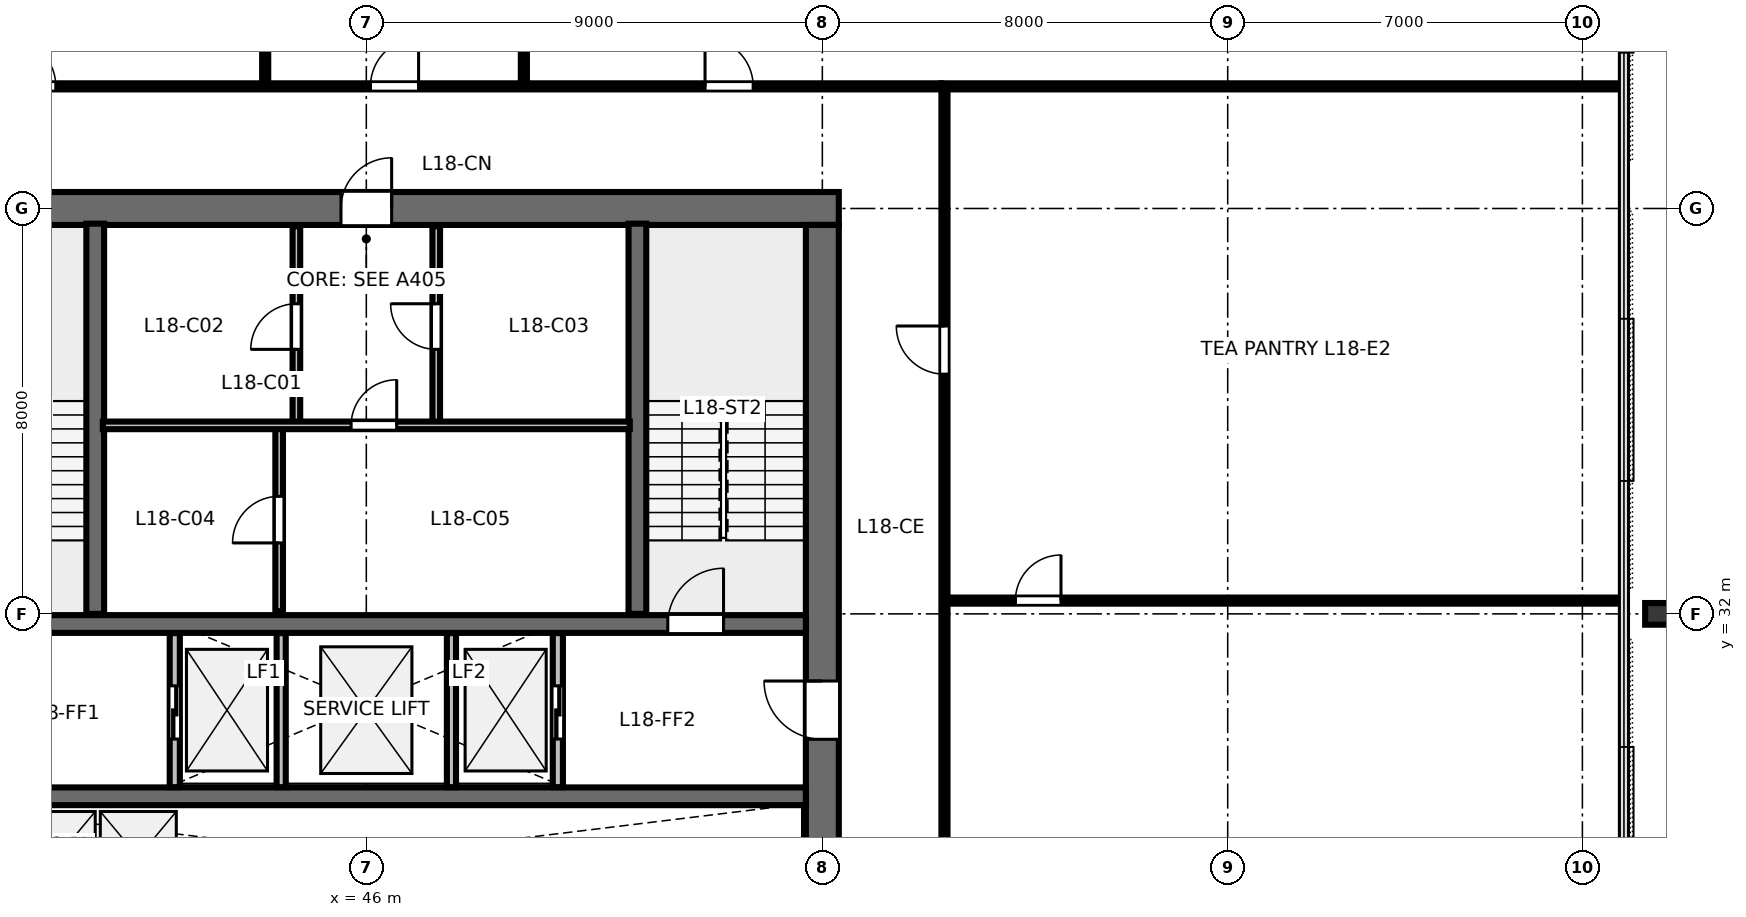
"""IFC4 building model, lengths in metres.
Left out: names, types, materials, properties, quantities, classifications, styles, units other than length and angle.
Written with IfcOpenShell. Run it as: python <this file> out.ifc"""

import sys

from ifc_helpers import new_model, si_unit, direction, frame, frame_2d, origin, origin_2d, place, context, subcontext, project, spatial, rectangle, i_section, extrude, element, fill, save


model = new_model("IFC4")
c1 = context("Model", 3, precision=1e-05, world=origin(), true_north=direction((0.0, 1.0)))
c2 = subcontext(c1, "Body", "Model", "MODEL_VIEW")
j1 = project(units=[si_unit("LENGTHUNIT", "METRE"), si_unit("PLANEANGLEUNIT", "RADIAN")], contexts=[c1])
p1 = place(None, origin())
s1 = spatial("IfcSite", under=j1, at=p1, CompositionType="ELEMENT")
p2 = place(p1, origin())
s2 = spatial("IfcBuilding", under=s1, at=p2, CompositionType="ELEMENT")
p3 = place(p2, frame((0.0, 0.0, 71.2)))
s3 = spatial("IfcBuildingStorey", under=s2, at=p3, CompositionType="ELEMENT", Elevation=71.2)
p4 = place(p3, frame((36.675, 40.0, 0.0), z_axis=(0.0, 0.0, 1.0), x_axis=(1.0, 0.0, 0.0)))
e1 = element("IfcWall", 1, at=p4, inside=s3, PredefinedType="SHEAR", context=c2, shape_type="SweptSolid", body=[
    extrude(rectangle(XDim=18.65, YDim=0.65, at=frame_2d((9.325, 0.0))), origin(), (0.0, 0.0, 1.0), 3.36),
])
p5 = place(p4, frame((8.825, 0.0, 0.0)))
e2 = element("IfcOpeningElement", 2, at=p5, cuts=e1, PredefinedType="OPENING", context=c2, shape_type="SweptSolid", body=[
    extrude(rectangle(XDim=1.0, YDim=2.15, at=frame_2d((0.5, 1.075))), frame((0.0, 0.335, 0.0), z_axis=(0.0, -1.0, 0.0), x_axis=(1.0, 0.0, 0.0)), (0.0, 0.0, 1.0), 0.67),
])
p6 = place(p3, frame((55.0, 24.325, 0.0), z_axis=(0.0, 0.0, 1.0), x_axis=(0.0, 1.0, 0.0)))
e3 = element("IfcWall", 3, at=p6, inside=s3, PredefinedType="SHEAR", context=c2, shape_type="SweptSolid", body=[
    extrude(rectangle(XDim=15.35, YDim=0.65, at=frame_2d((7.675, 0.0))), origin(), (0.0, 0.0, 1.0), 3.36),
])
p7 = place(p6, frame((5.2, 0.0, 0.0)))
e4 = element("IfcOpeningElement", 4, at=p7, cuts=e3, PredefinedType="OPENING", context=c2, shape_type="SweptSolid", body=[
    extrude(rectangle(XDim=1.15, YDim=2.15, at=frame_2d((0.575, 1.075))), frame((0.0, 0.335, 0.0), z_axis=(0.0, -1.0, 0.0), x_axis=(1.0, 0.0, 0.0)), (0.0, 0.0, 1.0), 0.67),
])
p8 = place(p3, frame((37.325, 31.8, 0.0), z_axis=(0.0, 0.0, 1.0), x_axis=(1.0, 0.0, 0.0)))
e5 = element("IfcWall", 5, at=p8, inside=s3, PredefinedType="SHEAR", context=c2, shape_type="SweptSolid", body=[
    extrude(rectangle(XDim=17.35, YDim=0.35, at=frame_2d((8.675, 0.0))), origin(), (0.0, 0.0, 1.0), 3.36),
])
p9 = place(p8, frame((0.725, 0.0, 0.0)))
e6 = element("IfcOpeningElement", 6, at=p9, cuts=e5, PredefinedType="OPENING", context=c2, shape_type="SweptSolid", body=[
    extrude(rectangle(XDim=1.1, YDim=2.15, at=frame_2d((0.55, 1.075))), frame((0.0, 0.185, 0.0), z_axis=(0.0, -1.0, 0.0), x_axis=(1.0, 0.0, 0.0)), (0.0, 0.0, 1.0), 0.37),
])
p10 = place(p8, frame((14.625, 0.0, 0.0)))
e7 = element("IfcOpeningElement", 7, at=p10, cuts=e5, PredefinedType="OPENING", context=c2, shape_type="SweptSolid", body=[
    extrude(rectangle(XDim=1.1, YDim=2.15, at=frame_2d((0.55, 1.075))), frame((0.0, 0.185, 0.0), z_axis=(0.0, -1.0, 0.0), x_axis=(1.0, 0.0, 0.0)), (0.0, 0.0, 1.0), 0.37),
])
p11 = place(p3, frame((37.325, 28.4, 0.0), z_axis=(0.0, 0.0, 1.0), x_axis=(1.0, 0.0, 0.0)))
e8 = element("IfcWall", 8, at=p11, inside=s3, PredefinedType="SHEAR", context=c2, shape_type="SweptSolid", body=[
    extrude(rectangle(XDim=17.35, YDim=0.35, at=frame_2d((8.675, 0.0))), origin(), (0.0, 0.0, 1.0), 3.36),
])
p12 = place(p3, frame((71.48, 32.0, 0.0), z_axis=(0.0, 0.0, 1.0), x_axis=(0.0, 1.0, 0.0)))
e9 = element("IfcColumn", 9, at=p12, inside=s3, PredefinedType="COLUMN", context=c2, shape_type="SweptSolid", body=[
    extrude(i_section(OverallWidth=0.428, OverallDepth=0.483, WebThickness=0.051, FlangeThickness=0.082, FilletRadius=0.025, at=origin_2d()), origin(), (0.0, 0.0, 1.0), 3.358),
])
for number, where, z_axis, x_axis in (
    (10, (40.65, 32.0, 0.0), (0.0, 0.0, 1.0), (0.0, 1.0, 0.0)),
    (11, (51.35, 32.0, 0.0), (0.0, 0.0, 1.0), (0.0, 1.0, 0.0)),
):
    element("IfcWall", number, at=place(p3, frame(where, z_axis=z_axis, x_axis=x_axis)), inside=s3, PredefinedType="SHEAR", context=c2, shape_type="SweptSolid", body=[
        extrude(rectangle(XDim=7.7, YDim=0.35, at=frame_2d((3.85, 0.0))), origin(), (0.0, 0.0, 1.0), 3.6),
    ])
p13 = place(p3, frame((44.62, 35.72, 0.0), z_axis=(0.0, 0.0, 1.0), x_axis=(0.0, 1.0, 0.0)))
e12 = element("IfcWall", 12, at=p13, inside=s3, PredefinedType="PARTITIONING", context=c2, shape_type="SweptSolid", body=[
    extrude(rectangle(XDim=3.93, YDim=0.15, at=frame_2d((1.965, 0.0))), origin(), (0.0, 0.0, 1.0), 3.36),
])
p14 = place(p13, frame((1.5, 0.0, 0.0)))
e13 = element("IfcOpeningElement", 13, at=p14, cuts=e12, PredefinedType="OPENING", context=c2, shape_type="SweptSolid", body=[
    extrude(rectangle(XDim=0.9, YDim=2.15, at=frame_2d((0.45, 1.075))), frame((0.0, 0.085, 0.0), z_axis=(0.0, -1.0, 0.0), x_axis=(1.0, 0.0, 0.0)), (0.0, 0.0, 1.0), 0.17),
])
p15 = place(p3, frame((47.38, 35.72, 0.0), z_axis=(0.0, 0.0, 1.0), x_axis=(0.0, 1.0, 0.0)))
e14 = element("IfcWall", 14, at=p15, inside=s3, PredefinedType="PARTITIONING", context=c2, shape_type="SweptSolid", body=[
    extrude(rectangle(XDim=3.93, YDim=0.15, at=frame_2d((1.965, 0.0))), origin(), (0.0, 0.0, 1.0), 3.36),
])
p16 = place(p15, frame((1.5, 0.0, 0.0)))
e15 = element("IfcOpeningElement", 15, at=p16, cuts=e14, PredefinedType="OPENING", context=c2, shape_type="SweptSolid", body=[
    extrude(rectangle(XDim=0.9, YDim=2.15, at=frame_2d((0.45, 1.075))), frame((0.0, 0.085, 0.0), z_axis=(0.0, -1.0, 0.0), x_axis=(1.0, 0.0, 0.0)), (0.0, 0.0, 1.0), 0.17),
])
p17 = place(p3, frame((44.28, 32.05, 0.0), z_axis=(0.0, 0.0, 1.0), x_axis=(0.0, 1.0, 0.0)))
e16 = element("IfcWall", 16, at=p17, inside=s3, PredefinedType="PARTITIONING", context=c2, shape_type="SweptSolid", body=[
    extrude(rectangle(XDim=3.67, YDim=0.15, at=frame_2d((1.835, 0.0))), origin(), (0.0, 0.0, 1.0), 3.36),
])
p18 = place(p17, frame((1.35, 0.0, 0.0)))
e17 = element("IfcOpeningElement", 17, at=p18, cuts=e16, PredefinedType="OPENING", context=c2, shape_type="SweptSolid", body=[
    extrude(rectangle(XDim=0.92, YDim=2.15, at=frame_2d((0.46, 1.075))), frame((0.0, 0.085, 0.0), z_axis=(0.0, -1.0, 0.0), x_axis=(1.0, 0.0, 0.0)), (0.0, 0.0, 1.0), 0.17),
])
p19 = place(p3, frame((40.8, 35.72, 0.0), z_axis=(0.0, 0.0, 1.0), x_axis=(1.0, 0.0, 0.0)))
e18 = element("IfcWall", 18, at=p19, inside=s3, PredefinedType="PARTITIONING", context=c2, shape_type="SweptSolid", body=[
    extrude(rectangle(XDim=10.4, YDim=0.15, at=frame_2d((5.2, 0.0))), origin(), (0.0, 0.0, 1.0), 3.36),
])
p20 = place(p19, frame((4.9, 0.0, 0.0)))
e19 = element("IfcOpeningElement", 19, at=p20, cuts=e18, PredefinedType="OPENING", context=c2, shape_type="SweptSolid", body=[
    extrude(rectangle(XDim=0.9, YDim=2.15, at=frame_2d((0.45, 1.075))), frame((0.0, 0.085, 0.0), z_axis=(0.0, -1.0, 0.0), x_axis=(1.0, 0.0, 0.0)), (0.0, 0.0, 1.0), 0.17),
])
p21 = place(p3, frame((42.22, 28.58, 0.0), z_axis=(0.0, 0.0, 1.0), x_axis=(0.0, 1.0, 0.0)))
e20 = element("IfcWall", 20, at=p21, inside=s3, PredefinedType="PARTITIONING", context=c2, shape_type="SweptSolid", body=[
    extrude(rectangle(XDim=3.04, YDim=0.2, at=frame_2d((1.52, 0.0))), origin(), (0.0, 0.0, 1.0), 3.36),
])
p22 = place(p21, frame((0.95, 0.0, 0.0)))
e21 = element("IfcOpeningElement", 21, at=p22, cuts=e20, PredefinedType="OPENING", context=c2, shape_type="SweptSolid", body=[
    extrude(rectangle(XDim=1.05, YDim=2.15, at=frame_2d((0.525, 1.075))), frame((0.0, 0.11, 0.0), z_axis=(0.0, -1.0, 0.0), x_axis=(1.0, 0.0, 0.0)), (0.0, 0.0, 1.0), 0.22),
])
p23 = place(p3, frame((49.78, 28.58, 0.0), z_axis=(0.0, 0.0, 1.0), x_axis=(0.0, 1.0, 0.0)))
e22 = element("IfcWall", 22, at=p23, inside=s3, PredefinedType="PARTITIONING", context=c2, shape_type="SweptSolid", body=[
    extrude(rectangle(XDim=3.04, YDim=0.2, at=frame_2d((1.52, 0.0))), origin(), (0.0, 0.0, 1.0), 3.36),
])
p24 = place(p23, frame((0.95, 0.0, 0.0)))
e23 = element("IfcOpeningElement", 23, at=p24, cuts=e22, PredefinedType="OPENING", context=c2, shape_type="SweptSolid", body=[
    extrude(rectangle(XDim=1.05, YDim=2.15, at=frame_2d((0.525, 1.075))), frame((0.0, 0.11, 0.0), z_axis=(0.0, -1.0, 0.0), x_axis=(1.0, 0.0, 0.0)), (0.0, 0.0, 1.0), 0.22),
])
for number, where, z_axis, x_axis in (
    (24, (44.32, 28.58, 0.0), (0.0, 0.0, 1.0), (0.0, 1.0, 0.0)),
    (25, (47.68, 28.58, 0.0), (0.0, 0.0, 1.0), (0.0, 1.0, 0.0)),
):
    element("IfcWall", number, at=place(p3, frame(where, z_axis=z_axis, x_axis=x_axis)), inside=s3, PredefinedType="PARTITIONING", context=c2, shape_type="SweptSolid", body=[
        extrude(rectangle(XDim=3.04, YDim=0.18, at=frame_2d((1.52, 0.0))), origin(), (0.0, 0.0, 1.0), 3.36),
    ])
p25 = place(p3, frame((44.004, 42.41, 0.0), z_axis=(0.0, 0.0, 1.0), x_axis=(0.0, 1.0, 0.0)))
e26 = element("IfcWall", 26, at=p25, inside=s3, PredefinedType="PARTITIONING", context=c2, shape_type="SweptSolid", body=[
    extrude(rectangle(XDim=11.41, YDim=0.12, at=frame_2d((5.705, 0.0))), origin(), (0.0, 0.0, 1.0), 2.64),
])
p26 = place(p25, frame((1.4, 0.0, 0.0)))
e27 = element("IfcOpeningElement", 27, at=p26, cuts=e26, PredefinedType="OPENING", context=c2, shape_type="SweptSolid", body=[
    extrude(rectangle(XDim=0.9, YDim=2.15, at=frame_2d((0.45, 1.075))), frame((0.0, 0.07, 0.0), z_axis=(0.0, -1.0, 0.0), x_axis=(1.0, 0.0, 0.0)), (0.0, 0.0, 1.0), 0.14),
])
p27 = place(p3, frame((49.11, 42.41, 0.0), z_axis=(0.0, 0.0, 1.0), x_axis=(0.0, 1.0, 0.0)))
e28 = element("IfcWall", 28, at=p27, inside=s3, PredefinedType="PARTITIONING", context=c2, shape_type="SweptSolid", body=[
    extrude(rectangle(XDim=11.41, YDim=0.12, at=frame_2d((5.705, 0.0))), origin(), (0.0, 0.0, 1.0), 2.64),
])
p28 = place(p27, frame((1.4, 0.0, 0.0)))
e29 = element("IfcOpeningElement", 29, at=p28, cuts=e28, PredefinedType="OPENING", context=c2, shape_type="SweptSolid", body=[
    extrude(rectangle(XDim=0.9, YDim=2.15, at=frame_2d((0.45, 1.075))), frame((0.0, 0.07, 0.0), z_axis=(0.0, -1.0, 0.0), x_axis=(1.0, 0.0, 0.0)), (0.0, 0.0, 1.0), 0.14),
])
p29 = place(p3, frame((34.65, 42.41, 0.0), z_axis=(0.0, 0.0, 1.0), x_axis=(1.0, 0.0, 0.0)))
e30 = element("IfcWall", 30, at=p29, inside=s3, PredefinedType="PARTITIONING", context=c2, shape_type="SweptSolid", body=[
    extrude(rectangle(XDim=22.7, YDim=0.12, at=frame_2d((11.35, 0.0))), origin(), (0.0, 0.0, 1.0), 2.64),
])
p30 = place(p29, frame((4.272, 0.0, 0.0)))
e31 = element("IfcOpeningElement", 31, at=p30, cuts=e30, PredefinedType="OPENING", context=c2, shape_type="SweptSolid", body=[
    extrude(rectangle(XDim=0.95, YDim=2.15, at=frame_2d((0.475, 1.075))), frame((0.0, 0.07, 0.0), z_axis=(0.0, -1.0, 0.0), x_axis=(1.0, 0.0, 0.0)), (0.0, 0.0, 1.0), 0.14),
])
p31 = place(p29, frame((11.432, 0.0, 0.0)))
e32 = element("IfcOpeningElement", 32, at=p31, cuts=e30, PredefinedType="OPENING", context=c2, shape_type="SweptSolid", body=[
    extrude(rectangle(XDim=0.95, YDim=2.15, at=frame_2d((0.475, 1.075))), frame((0.0, 0.07, 0.0), z_axis=(0.0, -1.0, 0.0), x_axis=(1.0, 0.0, 0.0)), (0.0, 0.0, 1.0), 0.14),
])
p32 = place(p29, frame((18.035, 0.0, 0.0)))
e33 = element("IfcOpeningElement", 33, at=p32, cuts=e30, PredefinedType="OPENING", context=c2, shape_type="SweptSolid", body=[
    extrude(rectangle(XDim=0.95, YDim=2.15, at=frame_2d((0.475, 1.075))), frame((0.0, 0.07, 0.0), z_axis=(0.0, -1.0, 0.0), x_axis=(1.0, 0.0, 0.0)), (0.0, 0.0, 1.0), 0.14),
])
p33 = place(p3, frame((57.41, 32.262, 0.0), z_axis=(0.0, 0.0, 1.0), x_axis=(1.0, 0.0, 0.0)))
e34 = element("IfcWall", 34, at=p33, inside=s3, PredefinedType="PARTITIONING", context=c2, shape_type="SweptSolid", body=[
    extrude(rectangle(XDim=13.41, YDim=0.12, at=frame_2d((6.705, 0.0))), origin(), (0.0, 0.0, 1.0), 2.64),
])
p34 = place(p33, frame((1.4, 0.0, 0.0)))
e35 = element("IfcOpeningElement", 35, at=p34, cuts=e34, PredefinedType="OPENING", context=c2, shape_type="SweptSolid", body=[
    extrude(rectangle(XDim=0.9, YDim=2.15, at=frame_2d((0.45, 1.075))), frame((0.0, 0.07, 0.0), z_axis=(0.0, -1.0, 0.0), x_axis=(1.0, 0.0, 0.0)), (0.0, 0.0, 1.0), 0.14),
])
p35 = place(p3, frame((57.41, 21.65, 0.0), z_axis=(0.0, 0.0, 1.0), x_axis=(0.0, 1.0, 0.0)))
e36 = element("IfcWall", 36, at=p35, inside=s3, PredefinedType="PARTITIONING", context=c2, shape_type="SweptSolid", body=[
    extrude(rectangle(XDim=20.7, YDim=0.12, at=frame_2d((10.35, 0.0))), origin(), (0.0, 0.0, 1.0), 2.64),
])
p36 = place(p35, frame((4.931, 0.0, 0.0)))
e37 = element("IfcOpeningElement", 37, at=p36, cuts=e36, PredefinedType="OPENING", context=c2, shape_type="SweptSolid", body=[
    extrude(rectangle(XDim=0.95, YDim=2.15, at=frame_2d((0.475, 1.075))), frame((0.0, 0.07, 0.0), z_axis=(0.0, -1.0, 0.0), x_axis=(1.0, 0.0, 0.0)), (0.0, 0.0, 1.0), 0.14),
])
p37 = place(p35, frame((15.081, 0.0, 0.0)))
e38 = element("IfcOpeningElement", 38, at=p37, cuts=e36, PredefinedType="OPENING", context=c2, shape_type="SweptSolid", body=[
    extrude(rectangle(XDim=0.95, YDim=2.15, at=frame_2d((0.475, 1.075))), frame((0.0, 0.07, 0.0), z_axis=(0.0, -1.0, 0.0), x_axis=(1.0, 0.0, 0.0)), (0.0, 0.0, 1.0), 0.14),
])
p38 = place(p3, frame((57.35, 42.41, 0.0), z_axis=(0.0, 0.0, 1.0), x_axis=(1.0, 0.0, 0.0)))
e39 = element("IfcWall", 39, at=p38, inside=s3, PredefinedType="PARTITIONING", context=c2, shape_type="SweptSolid", body=[
    extrude(rectangle(XDim=13.47, YDim=0.12, at=frame_2d((6.735, 0.0))), origin(), (0.0, 0.0, 1.0), 2.64),
])
p39 = place(p10, origin())
e40 = element("IfcDoor", 40, at=p39, inside=s3, OperationType="SINGLE_SWING_RIGHT", PredefinedType="DOOR", context=c2, shape_type="SweptSolid", body=[
    extrude(rectangle(XDim=1.1, YDim=2.15, at=frame_2d((0.55, 1.075))), frame((0.0, 0.025, 0.0), z_axis=(0.0, -1.0, 0.0), x_axis=(1.0, 0.0, 0.0)), (0.0, 0.0, 1.0), 0.05),
])
fill(e7, e40)
p40 = place(p5, origin())
e41 = element("IfcDoor", 41, at=p40, inside=s3, OperationType="SINGLE_SWING_RIGHT", PredefinedType="DOOR", context=c2, shape_type="SweptSolid", body=[
    extrude(rectangle(XDim=1.0, YDim=2.15, at=frame_2d((0.5, 1.075))), frame((0.0, 0.025, 0.0), z_axis=(0.0, -1.0, 0.0), x_axis=(1.0, 0.0, 0.0)), (0.0, 0.0, 1.0), 0.05),
])
fill(e2, e41)
p41 = place(p7, origin())
e42 = element("IfcDoor", 42, at=p41, inside=s3, OperationType="SINGLE_SWING_RIGHT", PredefinedType="DOOR", context=c2, shape_type="SweptSolid", body=[
    extrude(rectangle(XDim=1.15, YDim=2.15, at=frame_2d((0.575, 1.075))), frame((0.0, 0.025, 0.0), z_axis=(0.0, -1.0, 0.0), x_axis=(1.0, 0.0, 0.0)), (0.0, 0.0, 1.0), 0.05),
])
fill(e4, e42)
p42 = place(p14, origin())
e43 = element("IfcDoor", 43, at=p42, inside=s3, OperationType="SINGLE_SWING_LEFT", PredefinedType="DOOR", context=c2, shape_type="SweptSolid", body=[
    extrude(rectangle(XDim=0.9, YDim=2.15, at=frame_2d((0.45, 1.075))), frame((0.0, 0.025, 0.0), z_axis=(0.0, -1.0, 0.0), x_axis=(1.0, 0.0, 0.0)), (0.0, 0.0, 1.0), 0.05),
])
fill(e13, e43)
p43 = place(p16, origin())
e44 = element("IfcDoor", 44, at=p43, inside=s3, OperationType="SINGLE_SWING_RIGHT", PredefinedType="DOOR", context=c2, shape_type="SweptSolid", body=[
    extrude(rectangle(XDim=0.9, YDim=2.15, at=frame_2d((0.45, 1.075))), frame((0.0, 0.025, 0.0), z_axis=(0.0, -1.0, 0.0), x_axis=(1.0, 0.0, 0.0)), (0.0, 0.0, 1.0), 0.05),
])
fill(e15, e44)
p44 = place(p18, origin())
e45 = element("IfcDoor", 45, at=p44, inside=s3, OperationType="SINGLE_SWING_LEFT", PredefinedType="DOOR", context=c2, shape_type="SweptSolid", body=[
    extrude(rectangle(XDim=0.92, YDim=2.15, at=frame_2d((0.46, 1.075))), frame((0.0, 0.025, 0.0), z_axis=(0.0, -1.0, 0.0), x_axis=(1.0, 0.0, 0.0)), (0.0, 0.0, 1.0), 0.05),
])
fill(e17, e45)
p45 = place(p20, origin())
e46 = element("IfcDoor", 46, at=p45, inside=s3, OperationType="SINGLE_SWING_RIGHT", PredefinedType="DOOR", context=c2, shape_type="SweptSolid", body=[
    extrude(rectangle(XDim=0.9, YDim=2.15, at=frame_2d((0.45, 1.075))), frame((0.0, 0.025, 0.0), z_axis=(0.0, -1.0, 0.0), x_axis=(1.0, 0.0, 0.0)), (0.0, 0.0, 1.0), 0.05),
])
fill(e19, e46)
p46 = place(p22, origin())
e47 = element("IfcDoor", 47, at=p46, inside=s3, OperationType="SLIDING_TO_LEFT", PredefinedType="DOOR", context=c2, shape_type="SweptSolid", body=[
    extrude(rectangle(XDim=1.05, YDim=2.15, at=frame_2d((0.525, 1.075))), frame((0.0, 0.025, 0.0), z_axis=(0.0, -1.0, 0.0), x_axis=(1.0, 0.0, 0.0)), (0.0, 0.0, 1.0), 0.05),
])
fill(e21, e47)
p47 = place(p24, origin())
e48 = element("IfcDoor", 48, at=p47, inside=s3, OperationType="SLIDING_TO_RIGHT", PredefinedType="DOOR", context=c2, shape_type="SweptSolid", body=[
    extrude(rectangle(XDim=1.05, YDim=2.15, at=frame_2d((0.525, 1.075))), frame((0.0, 0.025, 0.0), z_axis=(0.0, -1.0, 0.0), x_axis=(1.0, 0.0, 0.0)), (0.0, 0.0, 1.0), 0.05),
])
fill(e23, e48)
p48 = place(p30, origin())
e49 = element("IfcDoor", 49, at=p48, inside=s3, OperationType="SINGLE_SWING_LEFT", PredefinedType="DOOR", context=c2, shape_type="SweptSolid", body=[
    extrude(rectangle(XDim=0.95, YDim=2.15, at=frame_2d((0.475, 1.075))), frame((0.0, 0.025, 0.0), z_axis=(0.0, -1.0, 0.0), x_axis=(1.0, 0.0, 0.0)), (0.0, 0.0, 1.0), 0.05),
])
fill(e31, e49)
p49 = place(p31, origin())
e50 = element("IfcDoor", 50, at=p49, inside=s3, OperationType="SINGLE_SWING_RIGHT", PredefinedType="DOOR", context=c2, shape_type="SweptSolid", body=[
    extrude(rectangle(XDim=0.95, YDim=2.15, at=frame_2d((0.475, 1.075))), frame((0.0, 0.025, 0.0), z_axis=(0.0, -1.0, 0.0), x_axis=(1.0, 0.0, 0.0)), (0.0, 0.0, 1.0), 0.05),
])
fill(e32, e50)
p50 = place(p32, origin())
e51 = element("IfcDoor", 51, at=p50, inside=s3, OperationType="SINGLE_SWING_LEFT", PredefinedType="DOOR", context=c2, shape_type="SweptSolid", body=[
    extrude(rectangle(XDim=0.95, YDim=2.15, at=frame_2d((0.475, 1.075))), frame((0.0, 0.025, 0.0), z_axis=(0.0, -1.0, 0.0), x_axis=(1.0, 0.0, 0.0)), (0.0, 0.0, 1.0), 0.05),
])
fill(e33, e51)
p51 = place(p34, origin())
e52 = element("IfcDoor", 52, at=p51, inside=s3, OperationType="SINGLE_SWING_RIGHT", PredefinedType="DOOR", context=c2, shape_type="SweptSolid", body=[
    extrude(rectangle(XDim=0.9, YDim=2.15, at=frame_2d((0.45, 1.075))), frame((0.0, 0.025, 0.0), z_axis=(0.0, -1.0, 0.0), x_axis=(1.0, 0.0, 0.0)), (0.0, 0.0, 1.0), 0.05),
])
fill(e35, e52)
p52 = place(p37, origin())
e53 = element("IfcDoor", 53, at=p52, inside=s3, OperationType="SINGLE_SWING_RIGHT", PredefinedType="DOOR", context=c2, shape_type="SweptSolid", body=[
    extrude(rectangle(XDim=0.95, YDim=2.15, at=frame_2d((0.475, 1.075))), frame((0.0, 0.025, 0.0), z_axis=(0.0, -1.0, 0.0), x_axis=(1.0, 0.0, 0.0)), (0.0, 0.0, 1.0), 0.05),
])
fill(e38, e53)
save(model, sys.argv[1])
